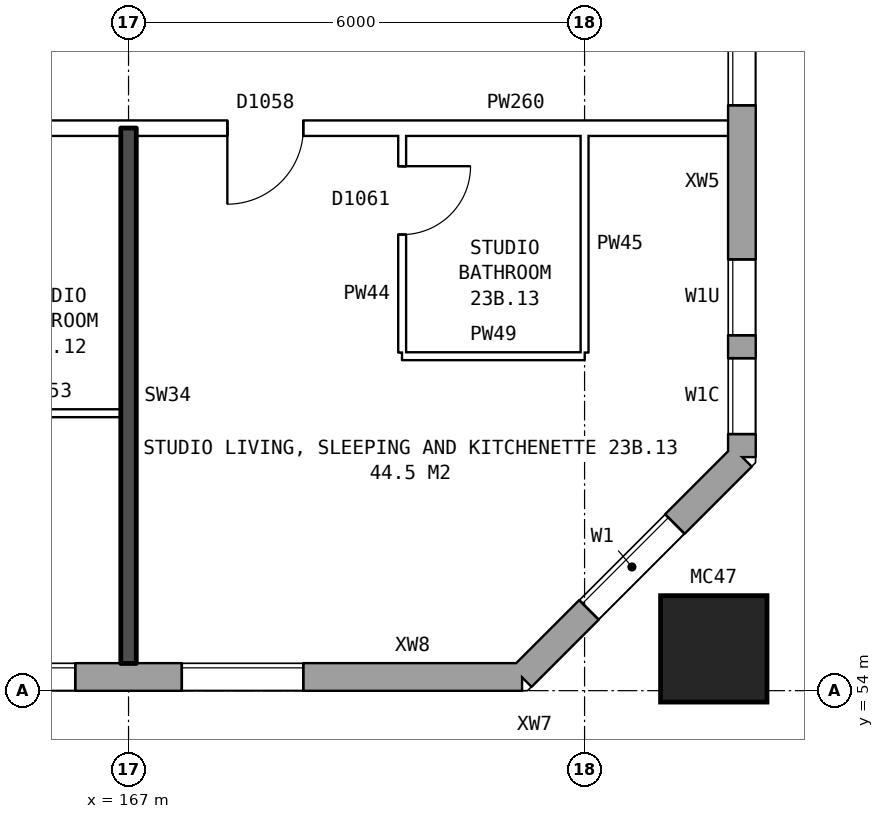
"""IFC4 building model, lengths in metres.
Left out: names, types, materials, properties, quantities, classifications, styles, units other than length and angle.
Written with IfcOpenShell. Run it as: python <this file> out.ifc"""

import sys

from ifc_helpers import new_model, si_unit, direction, frame, frame_2d, origin, origin_2d, place, context, subcontext, project, spatial, rectangle, hollow_rectangle, extrude, element, fill, save


model = new_model("IFC4")
c1 = context("Model", 3, precision=1e-05, world=origin(), true_north=direction((0.0, 1.0)))
c2 = subcontext(c1, "Body", "Model", "MODEL_VIEW")
j1 = project(units=[si_unit("LENGTHUNIT", "METRE"), si_unit("PLANEANGLEUNIT", "RADIAN")], contexts=[c1])
p1 = place(None, origin())
s1 = spatial("IfcSite", under=j1, at=p1, CompositionType="ELEMENT")
p2 = place(p1, origin())
s2 = spatial("IfcBuilding", under=s1, at=p2, CompositionType="ELEMENT")
p3 = place(p2, frame((0.0, 0.0, 84.0)))
s3 = spatial("IfcBuildingStorey", under=s2, at=p3, CompositionType="ELEMENT", Elevation=84.0)
p4 = place(p3, frame((174.7, 54.55, 0.0), z_axis=(0.0, 0.0, 1.0), x_axis=(1.0, 0.0, 0.0)))
e1 = element("IfcColumn", 1, at=p4, inside=s3, PredefinedType="COLUMN", context=c2, shape_type="SweptSolid", body=[
    extrude(hollow_rectangle(XDim=1.4, YDim=1.4, WallThickness=0.075, at=origin_2d()), origin(), (0.0, 0.0, 1.0), 3.1),
])
p5 = place(p3, frame((134.075, 54.18, 0.0), z_axis=(0.0, 0.0, 1.0), x_axis=(1.0, 0.0, 0.0)))
e2 = element("IfcWall", 2, at=p5, inside=s3, PredefinedType="STANDARD", context=c2, shape_type="SweptSolid", body=[
    extrude(rectangle(XDim=38.101, YDim=0.36, at=frame_2d((19.05, 0.0))), origin(), (0.0, 0.0, 1.0), 2.85),
])
p6 = place(p5, frame((0.625, 0.0, 0.8)))
e3 = element("IfcOpeningElement", 3, at=p6, cuts=e2, PredefinedType="OPENING", context=c2, shape_type="SweptSolid", body=[
    extrude(rectangle(XDim=1.6, YDim=1.8, at=frame_2d((0.8, 0.9))), frame((0.0, 0.19, 0.0), z_axis=(0.0, -1.0, 0.0), x_axis=(1.0, 0.0, 0.0)), (0.0, 0.0, 1.0), 0.38),
])
p7 = place(p5, frame((3.625, 0.0, 0.8)))
e4 = element("IfcOpeningElement", 4, at=p7, cuts=e2, PredefinedType="OPENING", context=c2, shape_type="SweptSolid", body=[
    extrude(rectangle(XDim=1.6, YDim=1.8, at=frame_2d((0.8, 0.9))), frame((0.0, 0.19, 0.0), z_axis=(0.0, -1.0, 0.0), x_axis=(1.0, 0.0, 0.0)), (0.0, 0.0, 1.0), 0.38),
])
p8 = place(p5, frame((6.625, 0.0, 0.8)))
e5 = element("IfcOpeningElement", 5, at=p8, cuts=e2, PredefinedType="OPENING", context=c2, shape_type="SweptSolid", body=[
    extrude(rectangle(XDim=1.6, YDim=1.8, at=frame_2d((0.8, 0.9))), frame((0.0, 0.19, 0.0), z_axis=(0.0, -1.0, 0.0), x_axis=(1.0, 0.0, 0.0)), (0.0, 0.0, 1.0), 0.38),
])
p9 = place(p5, frame((9.625, 0.0, 0.8)))
e6 = element("IfcOpeningElement", 6, at=p9, cuts=e2, PredefinedType="OPENING", context=c2, shape_type="SweptSolid", body=[
    extrude(rectangle(XDim=1.6, YDim=1.8, at=frame_2d((0.8, 0.9))), frame((0.0, 0.19, 0.0), z_axis=(0.0, -1.0, 0.0), x_axis=(1.0, 0.0, 0.0)), (0.0, 0.0, 1.0), 0.38),
])
p10 = place(p5, frame((12.075, 0.0, 0.8)))
e7 = element("IfcOpeningElement", 7, at=p10, cuts=e2, PredefinedType="OPENING", context=c2, shape_type="SweptSolid", body=[
    extrude(rectangle(XDim=1.4, YDim=1.8, at=frame_2d((0.7, 0.9))), frame((0.0, 0.19, 0.0), z_axis=(0.0, -1.0, 0.0), x_axis=(1.0, 0.0, 0.0)), (0.0, 0.0, 1.0), 0.38),
])
p11 = place(p5, frame((15.475, 0.0, 0.65)))
e8 = element("IfcOpeningElement", 8, at=p11, cuts=e2, PredefinedType="OPENING", context=c2, shape_type="SweptSolid", body=[
    extrude(rectangle(XDim=0.6, YDim=0.9, at=frame_2d((0.3, 0.45))), frame((0.0, 0.19, 0.0), z_axis=(0.0, -1.0, 0.0), x_axis=(1.0, 0.0, 0.0)), (0.0, 0.0, 1.0), 0.38),
])
p12 = place(p5, frame((18.625, 0.0, 0.8)))
e9 = element("IfcOpeningElement", 9, at=p12, cuts=e2, PredefinedType="OPENING", context=c2, shape_type="SweptSolid", body=[
    extrude(rectangle(XDim=1.6, YDim=1.8, at=frame_2d((0.8, 0.9))), frame((0.0, 0.19, 0.0), z_axis=(0.0, -1.0, 0.0), x_axis=(1.0, 0.0, 0.0)), (0.0, 0.0, 1.0), 0.38),
])
p13 = place(p5, frame((21.125, 0.0, 0.8)))
e10 = element("IfcOpeningElement", 10, at=p13, cuts=e2, PredefinedType="OPENING", context=c2, shape_type="SweptSolid", body=[
    extrude(rectangle(XDim=1.0, YDim=1.2, at=frame_2d((0.5, 0.6))), frame((0.0, 0.19, 0.0), z_axis=(0.0, -1.0, 0.0), x_axis=(1.0, 0.0, 0.0)), (0.0, 0.0, 1.0), 0.38),
])
p14 = place(p5, frame((24.625, 0.0, 0.8)))
e11 = element("IfcOpeningElement", 11, at=p14, cuts=e2, PredefinedType="OPENING", context=c2, shape_type="SweptSolid", body=[
    extrude(rectangle(XDim=1.6, YDim=1.8, at=frame_2d((0.8, 0.9))), frame((0.0, 0.19, 0.0), z_axis=(0.0, -1.0, 0.0), x_axis=(1.0, 0.0, 0.0)), (0.0, 0.0, 1.0), 0.38),
])
p15 = place(p5, frame((27.625, 0.0, 0.8)))
e12 = element("IfcOpeningElement", 12, at=p15, cuts=e2, PredefinedType="OPENING", context=c2, shape_type="SweptSolid", body=[
    extrude(rectangle(XDim=1.6, YDim=1.8, at=frame_2d((0.8, 0.9))), frame((0.0, 0.19, 0.0), z_axis=(0.0, -1.0, 0.0), x_axis=(1.0, 0.0, 0.0)), (0.0, 0.0, 1.0), 0.38),
])
p16 = place(p5, frame((30.625, 0.0, 0.8)))
e13 = element("IfcOpeningElement", 13, at=p16, cuts=e2, PredefinedType="OPENING", context=c2, shape_type="SweptSolid", body=[
    extrude(rectangle(XDim=1.6, YDim=1.8, at=frame_2d((0.8, 0.9))), frame((0.0, 0.19, 0.0), z_axis=(0.0, -1.0, 0.0), x_axis=(1.0, 0.0, 0.0)), (0.0, 0.0, 1.0), 0.38),
])
p17 = place(p5, frame((33.625, 0.0, 0.8)))
e14 = element("IfcOpeningElement", 14, at=p17, cuts=e2, PredefinedType="OPENING", context=c2, shape_type="SweptSolid", body=[
    extrude(rectangle(XDim=1.6, YDim=1.8, at=frame_2d((0.8, 0.9))), frame((0.0, 0.19, 0.0), z_axis=(0.0, -1.0, 0.0), x_axis=(1.0, 0.0, 0.0)), (0.0, 0.0, 1.0), 0.38),
])
p18 = place(p5, frame((13.775, 0.0, 1.6)))
e15 = element("IfcOpeningElement", 15, at=p18, cuts=e2, PredefinedType="OPENING", context=c2, shape_type="SweptSolid", body=[
    extrude(rectangle(XDim=0.6, YDim=0.9, at=frame_2d((0.3, 0.45))), frame((0.0, 0.19, 0.0), z_axis=(0.0, -1.0, 0.0), x_axis=(1.0, 0.0, 0.0)), (0.0, 0.0, 1.0), 0.38),
])
p19 = place(p5, frame((16.375, 0.0, 0.65)))
e16 = element("IfcOpeningElement", 16, at=p19, cuts=e2, PredefinedType="OPENING", context=c2, shape_type="SweptSolid", body=[
    extrude(rectangle(XDim=1.4, YDim=1.8, at=frame_2d((0.7, 0.9))), frame((0.0, 0.19, 0.0), z_axis=(0.0, -1.0, 0.0), x_axis=(1.0, 0.0, 0.0)), (0.0, 0.0, 1.0), 0.38),
])
p20 = place(p5, frame((23.625, 0.0, 1.7)))
e17 = element("IfcOpeningElement", 17, at=p20, cuts=e2, PredefinedType="OPENING", context=c2, shape_type="SweptSolid", body=[
    extrude(rectangle(XDim=0.6, YDim=0.9, at=frame_2d((0.3, 0.45))), frame((0.0, 0.19, 0.0), z_axis=(0.0, -1.0, 0.0), x_axis=(1.0, 0.0, 0.0)), (0.0, 0.0, 1.0), 0.38),
])
p21 = place(p3, frame((172.175, 54.18, 0.0), z_axis=(0.0, 0.0, 1.0), x_axis=(0.707106781187, 0.707106781187, 0.0)))
e18 = element("IfcWall", 18, at=p21, inside=s3, PredefinedType="STANDARD", context=c2, shape_type="SweptSolid", body=[
    extrude(rectangle(XDim=4.094, YDim=0.36, at=frame_2d((2.047, 0.0))), origin(), (0.0, 0.0, 1.0), 2.85),
])
p22 = place(p21, frame((1.247, 0.0, 0.8)))
e19 = element("IfcOpeningElement", 19, at=p22, cuts=e18, PredefinedType="OPENING", context=c2, shape_type="SweptSolid", body=[
    extrude(rectangle(XDim=1.6, YDim=1.8, at=frame_2d((0.8, 0.9))), frame((0.0, 0.19, 0.0), z_axis=(0.0, -1.0, 0.0), x_axis=(1.0, 0.0, 0.0)), (0.0, 0.0, 1.0), 0.38),
])
p23 = place(p3, frame((175.07, 57.075, 0.0), z_axis=(0.0, 0.0, 1.0), x_axis=(0.0, 1.0, 0.0)))
e20 = element("IfcWall", 20, at=p23, inside=s3, PredefinedType="STANDARD", context=c2, shape_type="SweptSolid", body=[
    extrude(rectangle(XDim=25.851, YDim=0.36, at=frame_2d((12.925, 0.0))), origin(), (0.0, 0.0, 1.0), 2.85),
])
p24 = place(p23, frame((0.3, 0.0, 0.8)))
e21 = element("IfcOpeningElement", 21, at=p24, cuts=e20, PredefinedType="OPENING", context=c2, shape_type="SweptSolid", body=[
    extrude(rectangle(XDim=1.0, YDim=1.8, at=frame_2d((0.5, 0.9))), frame((0.0, 0.19, 0.0), z_axis=(0.0, -1.0, 0.0), x_axis=(1.0, 0.0, 0.0)), (0.0, 0.0, 1.0), 0.38),
])
p25 = place(p23, frame((4.625, 0.0, 0.8)))
e22 = element("IfcOpeningElement", 22, at=p25, cuts=e20, PredefinedType="OPENING", context=c2, shape_type="SweptSolid", body=[
    extrude(rectangle(XDim=1.6, YDim=1.8, at=frame_2d((0.8, 0.9))), frame((0.0, 0.19, 0.0), z_axis=(0.0, -1.0, 0.0), x_axis=(1.0, 0.0, 0.0)), (0.0, 0.0, 1.0), 0.38),
])
p26 = place(p23, frame((7.625, 0.0, 0.8)))
e23 = element("IfcOpeningElement", 23, at=p26, cuts=e20, PredefinedType="OPENING", context=c2, shape_type="SweptSolid", body=[
    extrude(rectangle(XDim=1.6, YDim=1.8, at=frame_2d((0.8, 0.9))), frame((0.0, 0.19, 0.0), z_axis=(0.0, -1.0, 0.0), x_axis=(1.0, 0.0, 0.0)), (0.0, 0.0, 1.0), 0.38),
])
p27 = place(p23, frame((10.625, 0.0, 0.8)))
e24 = element("IfcOpeningElement", 24, at=p27, cuts=e20, PredefinedType="OPENING", context=c2, shape_type="SweptSolid", body=[
    extrude(rectangle(XDim=1.6, YDim=1.8, at=frame_2d((0.8, 0.9))), frame((0.0, 0.19, 0.0), z_axis=(0.0, -1.0, 0.0), x_axis=(1.0, 0.0, 0.0)), (0.0, 0.0, 1.0), 0.38),
])
p28 = place(p23, frame((13.625, 0.0, 0.8)))
e25 = element("IfcOpeningElement", 25, at=p28, cuts=e20, PredefinedType="OPENING", context=c2, shape_type="SweptSolid", body=[
    extrude(rectangle(XDim=1.6, YDim=1.8, at=frame_2d((0.8, 0.9))), frame((0.0, 0.19, 0.0), z_axis=(0.0, -1.0, 0.0), x_axis=(1.0, 0.0, 0.0)), (0.0, 0.0, 1.0), 0.38),
])
p29 = place(p23, frame((16.625, 0.0, 0.8)))
e26 = element("IfcOpeningElement", 26, at=p29, cuts=e20, PredefinedType="OPENING", context=c2, shape_type="SweptSolid", body=[
    extrude(rectangle(XDim=1.6, YDim=1.8, at=frame_2d((0.8, 0.9))), frame((0.0, 0.19, 0.0), z_axis=(0.0, -1.0, 0.0), x_axis=(1.0, 0.0, 0.0)), (0.0, 0.0, 1.0), 0.38),
])
p30 = place(p23, frame((19.625, 0.0, 0.8)))
e27 = element("IfcOpeningElement", 27, at=p30, cuts=e20, PredefinedType="OPENING", context=c2, shape_type="SweptSolid", body=[
    extrude(rectangle(XDim=1.6, YDim=1.8, at=frame_2d((0.8, 0.9))), frame((0.0, 0.19, 0.0), z_axis=(0.0, -1.0, 0.0), x_axis=(1.0, 0.0, 0.0)), (0.0, 0.0, 1.0), 0.38),
])
p31 = place(p23, frame((23.125, 0.0, 0.8)))
e28 = element("IfcOpeningElement", 28, at=p31, cuts=e20, PredefinedType="OPENING", context=c2, shape_type="SweptSolid", body=[
    extrude(rectangle(XDim=1.0, YDim=0.9, at=frame_2d((0.5, 0.45))), frame((0.0, 0.19, 0.0), z_axis=(0.0, -1.0, 0.0), x_axis=(1.0, 0.0, 0.0)), (0.0, 0.0, 1.0), 0.38),
])
p32 = place(p23, frame((1.6, 0.0, 0.8)))
e29 = element("IfcOpeningElement", 29, at=p32, cuts=e20, PredefinedType="OPENING", context=c2, shape_type="SweptSolid", body=[
    extrude(rectangle(XDim=1.0, YDim=0.9, at=frame_2d((0.5, 0.45))), frame((0.0, 0.19, 0.0), z_axis=(0.0, -1.0, 0.0), x_axis=(1.0, 0.0, 0.0)), (0.0, 0.0, 1.0), 0.38),
])
p33 = place(p23, frame((24.425, 0.0, 0.8)))
e30 = element("IfcOpeningElement", 30, at=p33, cuts=e20, PredefinedType="OPENING", context=c2, shape_type="SweptSolid", body=[
    extrude(rectangle(XDim=1.0, YDim=1.8, at=frame_2d((0.5, 0.9))), frame((0.0, 0.19, 0.0), z_axis=(0.0, -1.0, 0.0), x_axis=(1.0, 0.0, 0.0)), (0.0, 0.0, 1.0), 0.38),
])
p34 = place(p3, frame((165.0, 57.65, 0.0), z_axis=(0.0, 0.0, 1.0), x_axis=(1.0, 0.0, 0.0)))
e31 = element("IfcWall", 31, at=p34, inside=s3, PredefinedType="PARTITIONING", context=c2, shape_type="SweptSolid", body=[
    extrude(rectangle(XDim=1.9, YDim=0.1, at=frame_2d((0.95, 0.0))), origin(), (0.0, 0.0, 1.0), 2.85),
])
p35 = place(p3, frame((170.6, 58.4, 0.0), z_axis=(0.0, 0.0, 1.0), x_axis=(1.0, 0.0, 0.0)))
e32 = element("IfcWall", 32, at=p35, inside=s3, PredefinedType="PARTITIONING", context=c2, shape_type="SweptSolid", body=[
    extrude(rectangle(XDim=2.4, YDim=0.1, at=frame_2d((1.2, 0.0))), origin(), (0.0, 0.0, 1.0), 2.85),
])
p36 = place(p3, frame((155.1, 61.4, 0.0), z_axis=(0.0, 0.0, 1.0), x_axis=(1.0, 0.0, 0.0)))
e33 = element("IfcWall", 33, at=p36, inside=s3, PredefinedType="PARTITIONING", context=c2, shape_type="SweptSolid", body=[
    extrude(rectangle(XDim=19.79, YDim=0.2, at=frame_2d((9.895, 0.0))), origin(), (0.0, 0.0, 1.0), 2.85),
])
p37 = place(p36, frame((1.45, 0.0, 0.0)))
e34 = element("IfcOpeningElement", 34, at=p37, cuts=e33, PredefinedType="OPENING", context=c2, shape_type="SweptSolid", body=[
    extrude(rectangle(XDim=1.0, YDim=2.1, at=frame_2d((0.5, 1.05))), frame((0.0, 0.11, 0.0), z_axis=(0.0, -1.0, 0.0), x_axis=(1.0, 0.0, 0.0)), (0.0, 0.0, 1.0), 0.22),
])
p38 = place(p36, frame((7.4, 0.0, 0.0)))
e35 = element("IfcOpeningElement", 35, at=p38, cuts=e33, PredefinedType="OPENING", context=c2, shape_type="SweptSolid", body=[
    extrude(rectangle(XDim=1.0, YDim=2.1, at=frame_2d((0.5, 1.05))), frame((0.0, 0.11, 0.0), z_axis=(0.0, -1.0, 0.0), x_axis=(1.0, 0.0, 0.0)), (0.0, 0.0, 1.0), 0.22),
])
p39 = place(p36, frame((13.2, 0.0, 0.0)))
e36 = element("IfcOpeningElement", 36, at=p39, cuts=e33, PredefinedType="OPENING", context=c2, shape_type="SweptSolid", body=[
    extrude(rectangle(XDim=1.0, YDim=2.1, at=frame_2d((0.5, 1.05))), frame((0.0, 0.11, 0.0), z_axis=(0.0, -1.0, 0.0), x_axis=(1.0, 0.0, 0.0)), (0.0, 0.0, 1.0), 0.22),
])
p40 = place(p3, frame((167.0, 54.36, 0.0), z_axis=(0.0, 0.0, 1.0), x_axis=(0.0, 1.0, 0.0)))
e37 = element("IfcWall", 37, at=p40, inside=s3, PredefinedType="SOLIDWALL", context=c2, shape_type="SweptSolid", body=[
    extrude(rectangle(XDim=7.04, YDim=0.2, at=frame_2d((3.52, 0.0))), origin(), (0.0, 0.0, 1.0), 2.85),
])
p41 = place(p3, frame((170.6, 58.45, 0.0), z_axis=(0.0, 0.0, 1.0), x_axis=(0.0, 1.0, 0.0)))
e38 = element("IfcWall", 38, at=p41, inside=s3, PredefinedType="PARTITIONING", context=c2, shape_type="SweptSolid", body=[
    extrude(rectangle(XDim=2.85, YDim=0.1, at=frame_2d((1.425, 0.0))), origin(), (0.0, 0.0, 1.0), 2.85),
])
p42 = place(p41, frame((1.55, 0.0, 0.0)))
e39 = element("IfcOpeningElement", 39, at=p42, cuts=e38, PredefinedType="OPENING", context=c2, shape_type="SweptSolid", body=[
    extrude(rectangle(XDim=0.9, YDim=2.1, at=frame_2d((0.45, 1.05))), frame((0.0, 0.06, 0.0), z_axis=(0.0, -1.0, 0.0), x_axis=(1.0, 0.0, 0.0)), (0.0, 0.0, 1.0), 0.12),
])
p43 = place(p3, frame((173.0, 58.45, 0.0), z_axis=(0.0, 0.0, 1.0), x_axis=(0.0, 1.0, 0.0)))
e40 = element("IfcWall", 40, at=p43, inside=s3, PredefinedType="PARTITIONING", context=c2, shape_type="SweptSolid", body=[
    extrude(rectangle(XDim=2.85, YDim=0.1, at=frame_2d((1.425, 0.0))), origin(), (0.0, 0.0, 1.0), 2.85),
])
p44 = place(p16, origin())
e41 = element("IfcWindow", 41, at=p44, inside=s3, PartitioningType="SINGLE_PANEL", PredefinedType="WINDOW", context=c2, shape_type="SweptSolid", body=[
    extrude(rectangle(XDim=1.6, YDim=1.8, at=frame_2d((0.8, 0.9))), frame((0.0, 0.15, 0.0), z_axis=(0.0, -1.0, 0.0), x_axis=(1.0, 0.0, 0.0)), (0.0, 0.0, 1.0), 0.06),
])
fill(e13, e41)
p45 = place(p17, origin())
e42 = element("IfcWindow", 42, at=p45, inside=s3, PartitioningType="SINGLE_PANEL", PredefinedType="WINDOW", context=c2, shape_type="SweptSolid", body=[
    extrude(rectangle(XDim=1.6, YDim=1.8, at=frame_2d((0.8, 0.9))), frame((0.0, 0.15, 0.0), z_axis=(0.0, -1.0, 0.0), x_axis=(1.0, 0.0, 0.0)), (0.0, 0.0, 1.0), 0.06),
])
fill(e14, e42)
p46 = place(p22, origin())
e43 = element("IfcWindow", 43, at=p46, inside=s3, PartitioningType="SINGLE_PANEL", PredefinedType="WINDOW", context=c2, shape_type="SweptSolid", body=[
    extrude(rectangle(XDim=1.6, YDim=1.8, at=frame_2d((0.8, 0.9))), frame((0.0, 0.15, 0.0), z_axis=(0.0, -1.0, 0.0), x_axis=(1.0, 0.0, 0.0)), (0.0, 0.0, 1.0), 0.06),
])
fill(e19, e43)
p47 = place(p24, origin())
e44 = element("IfcWindow", 44, at=p47, inside=s3, PartitioningType="SINGLE_PANEL", PredefinedType="WINDOW", context=c2, shape_type="SweptSolid", body=[
    extrude(rectangle(XDim=1.0, YDim=1.8, at=frame_2d((0.5, 0.9))), frame((0.0, 0.15, 0.0), z_axis=(0.0, -1.0, 0.0), x_axis=(1.0, 0.0, 0.0)), (0.0, 0.0, 1.0), 0.06),
])
fill(e21, e44)
p48 = place(p25, origin())
e45 = element("IfcWindow", 45, at=p48, inside=s3, PartitioningType="SINGLE_PANEL", PredefinedType="WINDOW", context=c2, shape_type="SweptSolid", body=[
    extrude(rectangle(XDim=1.6, YDim=1.8, at=frame_2d((0.8, 0.9))), frame((0.0, 0.15, 0.0), z_axis=(0.0, -1.0, 0.0), x_axis=(1.0, 0.0, 0.0)), (0.0, 0.0, 1.0), 0.06),
])
fill(e22, e45)
p49 = place(p39, frame((1.0, 0.0, 0.0), z_axis=(0.0, 0.0, 1.0), x_axis=(-1.0, 0.0, 0.0)))
e46 = element("IfcDoor", 46, at=p49, inside=s3, OperationType="SINGLE_SWING_RIGHT", PredefinedType="DOOR", context=c2, shape_type="SweptSolid", body=[
    extrude(rectangle(XDim=1.0, YDim=2.1, at=frame_2d((0.5, 1.05))), frame((0.0, 0.025, 0.0), z_axis=(0.0, -1.0, 0.0), x_axis=(1.0, 0.0, 0.0)), (0.0, 0.0, 1.0), 0.05),
])
fill(e36, e46)
p50 = place(p42, frame((0.9, 0.0, 0.0), z_axis=(0.0, 0.0, 1.0), x_axis=(-1.0, 0.0, 0.0)))
e47 = element("IfcDoor", 47, at=p50, inside=s3, OperationType="SINGLE_SWING_LEFT", PredefinedType="DOOR", context=c2, shape_type="SweptSolid", body=[
    extrude(rectangle(XDim=0.9, YDim=2.1, at=frame_2d((0.45, 1.05))), frame((0.0, 0.025, 0.0), z_axis=(0.0, -1.0, 0.0), x_axis=(1.0, 0.0, 0.0)), (0.0, 0.0, 1.0), 0.05),
])
fill(e39, e47)
p51 = place(p32, origin())
e48 = element("IfcWindow", 48, at=p51, inside=s3, PartitioningType="SINGLE_PANEL", PredefinedType="WINDOW", context=c2, shape_type="SweptSolid", body=[
    extrude(rectangle(XDim=1.0, YDim=0.9, at=frame_2d((0.5, 0.45))), frame((0.0, 0.15, 0.0), z_axis=(0.0, -1.0, 0.0), x_axis=(1.0, 0.0, 0.0)), (0.0, 0.0, 1.0), 0.06),
])
fill(e29, e48)
save(model, sys.argv[1])
